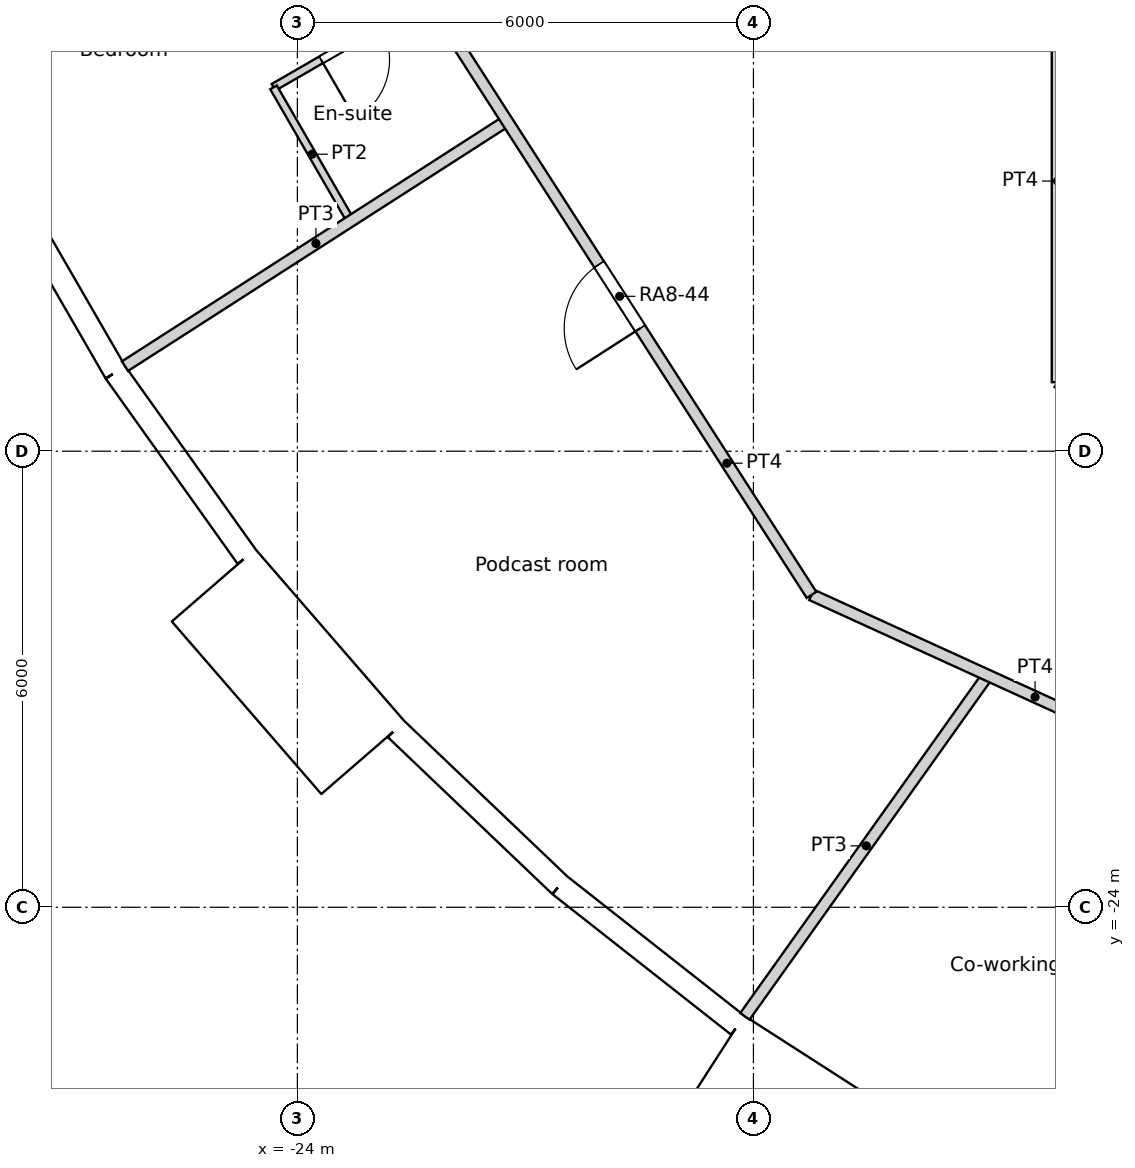
"""IFC4 building model, lengths in metres.
Left out: names, types, materials, properties, quantities, classifications, styles, units other than length and angle.
Written with IfcOpenShell. Run it as: python <this file> out.ifc"""

import sys

from ifc_helpers import new_model, si_unit, direction, frame, frame_2d, origin, origin_2d, place, context, subcontext, project, spatial, rectangle, circle, extrude, element, fill, save


model = new_model("IFC4")
c1 = context("Model", 3, precision=1e-05, world=origin(), true_north=direction((0.0, 1.0)))
c2 = subcontext(c1, "Body", "Model", "MODEL_VIEW")
j1 = project(units=[si_unit("LENGTHUNIT", "METRE"), si_unit("PLANEANGLEUNIT", "RADIAN")], contexts=[c1])
p1 = place(None, origin())
s1 = spatial("IfcSite", under=j1, at=p1, CompositionType="ELEMENT")
p2 = place(p1, origin())
s2 = spatial("IfcBuilding", under=s1, at=p2, CompositionType="ELEMENT")
p3 = place(p2, frame((0.0, 0.0, 103.8)))
s3 = spatial("IfcBuildingStorey", under=s2, at=p3, CompositionType="ELEMENT", Elevation=103.8)
for number, where, z_axis, x_axis in (
    (1, (-26.909, -13.873, 0.0), (0.0, 0.0, 1.0), (1.0, 0.0, 0.0)),
    (2, (-23.797, -18.715, 0.0), (0.0, 0.0, 1.0), (1.0, 0.0, 0.0)),
    (3, (-19.826, -22.88, 0.0), (0.0, 0.0, 1.0), (1.0, 0.0, 0.0)),
    (4, (-15.137, -26.219, 0.0), (0.0, 0.0, 1.0), (1.0, 0.0, 0.0)),
):
    element("IfcColumn", number, at=place(p3, frame(where, z_axis=z_axis, x_axis=x_axis)), inside=s3, PredefinedType="COLUMN", context=c2, shape_type="SweptSolid", body=[
        extrude(circle(Radius=0.6, at=origin_2d()), origin(), (0.0, 0.0, 1.0), 3.6),
    ])
for number, where, z_axis, x_axis in (
    (5, (-20.509, -13.489, 0.0), (0.0, 0.0, 1.0), (1.0, 0.0, 0.0)),
    (6, (-16.846, -17.855, 0.0), (0.0, 0.0, 1.0), (1.0, 0.0, 0.0)),
):
    element("IfcColumn", number, at=place(p3, frame(where, z_axis=z_axis, x_axis=x_axis)), inside=s3, PredefinedType="COLUMN", context=c2, shape_type="SweptSolid", body=[
        extrude(circle(Radius=0.65, at=origin_2d()), origin(), (0.0, 0.0, 1.0), 3.6),
    ])
p4 = place(p3, frame((-13.798, -12.802, 0.0), z_axis=(0.0, 0.0, 1.0), x_axis=(1.0, 0.0, 0.0)))
e7 = element("IfcColumn", 7, at=p4, inside=s3, PredefinedType="COLUMN", context=c2, shape_type="SweptSolid", body=[
    extrude(circle(Radius=0.7, at=origin_2d()), origin(), (0.0, 0.0, 1.0), 3.6),
])
p5 = place(p3, frame((-27.884, -14.382, 0.0), z_axis=(0.0, 0.0, 1.0), x_axis=(0.500025049464, -0.866010940986, 0.0)))
e8 = element("IfcWall", 8, at=p5, inside=s3, PredefinedType="SOLIDWALL", context=c2, shape_type="SweptSolid", body=[
    extrude(rectangle(XDim=2.98, YDim=0.3, at=frame_2d((1.49, 0.0))), origin(), (0.0, 0.0, 1.0), 3.15),
])
p6 = place(p5, frame((1.49, 0.0, 1.55)))
e9 = element("IfcOpeningElement", 9, at=p6, cuts=e8, PredefinedType="OPENING", context=c2, shape_type="SweptSolid", body=[
    extrude(circle(Radius=0.9, at=origin_2d()), frame((0.0, 0.16, 0.0), z_axis=(0.0, -1.0, 0.0), x_axis=(1.0, 0.0, 0.0)), (0.0, 0.0, 1.0), 0.32),
])
p7 = place(p3, frame((-26.394, -16.962, 0.0), z_axis=(0.0, 0.0, 1.0), x_axis=(0.580059407678, -0.81457417315, 0.0)))
e10 = element("IfcWall", 10, at=p7, inside=s3, PredefinedType="SOLIDWALL", context=c2, shape_type="SweptSolid", body=[
    extrude(rectangle(XDim=2.979, YDim=0.3, at=frame_2d((1.49, 0.0))), origin(), (0.0, 0.0, 1.0), 3.15),
])
p8 = place(p7, frame((1.49, 0.0, 1.55)))
e11 = element("IfcOpeningElement", 11, at=p8, cuts=e10, PredefinedType="OPENING", context=c2, shape_type="SweptSolid", body=[
    extrude(circle(Radius=0.9, at=origin_2d()), frame((0.0, 0.16, 0.0), z_axis=(0.0, -1.0, 0.0), x_axis=(1.0, 0.0, 0.0)), (0.0, 0.0, 1.0), 0.32),
])
p9 = place(p3, frame((-25.101, -19.766, -0.45), z_axis=(0.0, 0.0, 1.0), x_axis=(0.654890259022, -0.75572398972, 0.0)))
e12 = element("IfcWall", 12, at=p9, inside=s3, PredefinedType="ELEMENTEDWALL", context=c2, shape_type="SweptSolid", body=[
    extrude(rectangle(XDim=3.0, YDim=1.45, at=frame_2d((1.5, 0.0))), origin(), (0.0, 0.0, 1.0), 3.6),
])
p10 = place(p9, frame((1.5, 0.0, 2.0)))
e13 = element("IfcOpeningElement", 13, at=p10, cuts=e12, PredefinedType="OPENING", context=c2, shape_type="SweptSolid", body=[
    extrude(circle(Radius=0.9, at=origin_2d()), frame((0.0, 0.735, 0.0), z_axis=(0.0, -1.0, 0.0), x_axis=(1.0, 0.0, 0.0)), (0.0, 0.0, 1.0), 1.47),
])
p11 = place(p3, frame((-22.702, -21.655, 0.0), z_axis=(0.0, 0.0, 1.0), x_axis=(0.723744206617, -0.690068346896, 0.0)))
e14 = element("IfcWall", 14, at=p11, inside=s3, PredefinedType="SOLIDWALL", context=c2, shape_type="SweptSolid", body=[
    extrude(rectangle(XDim=2.98, YDim=0.3, at=frame_2d((1.49, 0.0))), origin(), (0.0, 0.0, 1.0), 3.15),
])
p12 = place(p11, frame((1.49, 0.0, 1.55)))
e15 = element("IfcOpeningElement", 15, at=p12, cuts=e14, PredefinedType="OPENING", context=c2, shape_type="SweptSolid", body=[
    extrude(circle(Radius=0.9, at=origin_2d()), frame((0.0, 0.16, 0.0), z_axis=(0.0, -1.0, 0.0), x_axis=(1.0, 0.0, 0.0)), (0.0, 0.0, 1.0), 0.32),
])
p13 = place(p3, frame((-20.546, -23.711, 0.0), z_axis=(0.0, 0.0, 1.0), x_axis=(0.786045331304, -0.618168858108, 0.0)))
e16 = element("IfcWall", 16, at=p13, inside=s3, PredefinedType="SOLIDWALL", context=c2, shape_type="SweptSolid", body=[
    extrude(rectangle(XDim=2.98, YDim=0.3, at=frame_2d((1.49, 0.0))), origin(), (0.0, 0.0, 1.0), 3.15),
])
p14 = place(p13, frame((1.49, 0.0, 1.55)))
e17 = element("IfcOpeningElement", 17, at=p14, cuts=e16, PredefinedType="OPENING", context=c2, shape_type="SweptSolid", body=[
    extrude(circle(Radius=0.9, at=origin_2d()), frame((0.0, 0.16, 0.0), z_axis=(0.0, -1.0, 0.0), x_axis=(1.0, 0.0, 0.0)), (0.0, 0.0, 1.0), 0.32),
])
p15 = place(p3, frame((-18.516, -26.037, -0.45), z_axis=(0.0, 0.0, 1.0), x_axis=(0.841223422347, -0.540687667415, 0.0)))
e18 = element("IfcWall", 18, at=p15, inside=s3, PredefinedType="ELEMENTEDWALL", context=c2, shape_type="SweptSolid", body=[
    extrude(rectangle(XDim=3.0, YDim=1.45, at=frame_2d((1.5, 0.0))), origin(), (0.0, 0.0, 1.0), 3.6),
])
p16 = place(p15, frame((1.5, 0.0, 2.0)))
e19 = element("IfcOpeningElement", 19, at=p16, cuts=e18, PredefinedType="OPENING", context=c2, shape_type="SweptSolid", body=[
    extrude(circle(Radius=0.9, at=origin_2d()), frame((0.0, 0.735, 0.0), z_axis=(0.0, -1.0, 0.0), x_axis=(1.0, 0.0, 0.0)), (0.0, 0.0, 1.0), 1.47),
])
p17 = place(p3, frame((-14.0, -17.092, 0.0), z_axis=(0.0, 0.0, 1.0), x_axis=(0.0, 1.0, 0.0)))
e20 = element("IfcWall", 20, at=p17, inside=s3, PredefinedType="PARTITIONING", context=c2, shape_type="SweptSolid", body=[
    extrude(rectangle(XDim=5.292, YDim=0.15, at=frame_2d((2.646, 0.0))), origin(), (0.0, 0.0, 1.0), 3.15),
])
p18 = place(p3, frame((-22.283, -12.036, 0.0), z_axis=(0.0, 0.0, 1.0), x_axis=(0.540591053907, -0.841285511842, 0.0)))
e21 = element("IfcWall", 21, at=p18, inside=s3, PredefinedType="PARTITIONING", context=c2, shape_type="SweptSolid", body=[
    extrude(rectangle(XDim=9.336, YDim=0.15, at=frame_2d((4.668, 0.0))), origin(), (0.0, 0.0, 1.0), 3.15),
])
p19 = place(p18, frame((4.167, 0.0, 0.0)))
e22 = element("IfcOpeningElement", 22, at=p19, cuts=e21, PredefinedType="OPENING", context=c2, shape_type="SweptSolid", body=[
    extrude(rectangle(XDim=1.0, YDim=2.04, at=frame_2d((0.5, 1.02))), frame((0.0, 0.075, 0.0), z_axis=(0.0, -1.0, 0.0), x_axis=(1.0, 0.0, 0.0)), (0.0, 0.0, 1.0), 0.15),
])
p20 = place(p3, frame((-14.0, -17.092, 0.0), z_axis=(0.0, 0.0, 1.0), x_axis=(0.86602719091, -0.499996904595, 0.0)))
e23 = element("IfcWall", 23, at=p20, inside=s3, PredefinedType="PARTITIONING", context=c2, shape_type="SweptSolid", body=[
    extrude(rectangle(XDim=9.42, YDim=0.15, at=frame_2d((4.71, 0.0))), origin(), (0.0, 0.0, 1.0), 3.15),
])
p21 = place(p3, frame((-17.235, -19.89, 0.0), z_axis=(0.0, 0.0, 1.0), x_axis=(0.909624174921, -0.415432136936, 0.0)))
e24 = element("IfcWall", 24, at=p21, inside=s3, PredefinedType="PARTITIONING", context=c2, shape_type="SweptSolid", body=[
    extrude(rectangle(XDim=14.83, YDim=0.15, at=frame_2d((7.415, 0.0))), origin(), (0.0, 0.0, 1.0), 3.15),
])
p22 = place(p21, frame((6.515, 0.0, 0.0)))
e25 = element("IfcOpeningElement", 25, at=p22, cuts=e24, PredefinedType="OPENING", context=c2, shape_type="SweptSolid", body=[
    extrude(rectangle(XDim=1.8, YDim=2.1, at=frame_2d((0.9, 1.05))), frame((0.0, 0.075, 0.0), z_axis=(0.0, -1.0, 0.0), x_axis=(1.0, 0.0, 0.0)), (0.0, 0.0, 1.0), 0.15),
])
p23 = place(p3, frame((-24.314, -13.213, 0.0), z_axis=(0.0, 0.0, 1.0), x_axis=(0.866007195875, 0.500031535699, 0.0)))
e26 = element("IfcWall", 26, at=p23, inside=s3, PredefinedType="PARTITIONING", context=c2, shape_type="SweptSolid", body=[
    extrude(rectangle(XDim=2.347, YDim=0.1, at=frame_2d((1.174, 0.0))), origin(), (0.0, 0.0, 1.0), 3.15),
])
p24 = place(p23, frame((0.724, 0.0, 0.0)))
e27 = element("IfcOpeningElement", 27, at=p24, cuts=e26, PredefinedType="OPENING", context=c2, shape_type="SweptSolid", body=[
    extrude(rectangle(XDim=0.9, YDim=2.04, at=frame_2d((0.45, 1.02))), frame((0.0, 0.05, 0.0), z_axis=(0.0, -1.0, 0.0), x_axis=(1.0, 0.0, 0.0)), (0.0, 0.0, 1.0), 0.1),
])
p25 = place(p3, frame((-24.314, -13.213, 0.0), z_axis=(0.0, 0.0, 1.0), x_axis=(0.499899251727, -0.866083563014, 0.0)))
e28 = element("IfcWall", 28, at=p25, inside=s3, PredefinedType="PARTITIONING", context=c2, shape_type="SweptSolid", body=[
    extrude(rectangle(XDim=2.032, YDim=0.1, at=frame_2d((1.016, 0.0))), origin(), (0.0, 0.0, 1.0), 3.15),
])
p26 = place(p3, frame((-26.268, -16.881, 0.0), z_axis=(0.0, 0.0, 1.0), x_axis=(0.841333855553, 0.540515812443, 0.0)))
e29 = element("IfcWall", 29, at=p26, inside=s3, PredefinedType="PARTITIONING", context=c2, shape_type="SweptSolid", body=[
    extrude(rectangle(XDim=5.972, YDim=0.15, at=frame_2d((2.986, 0.0))), origin(), (0.0, 0.0, 1.0), 3.15),
])
p27 = place(p3, frame((-18.112, -25.435, 0.0), z_axis=(0.0, 0.0, 1.0), x_axis=(0.580004598464, 0.81461320009, 0.0)))
e30 = element("IfcWall", 30, at=p27, inside=s3, PredefinedType="PARTITIONING", context=c2, shape_type="SweptSolid", body=[
    extrude(rectangle(XDim=5.507, YDim=0.15, at=frame_2d((2.753, 0.0))), origin(), (0.0, 0.0, 1.0), 3.15),
])
p28 = place(p6, origin())
e31 = element("IfcWindow", 31, at=p28, inside=s3, PartitioningType="SINGLE_PANEL", PredefinedType="WINDOW", context=c2, shape_type="SweptSolid", body=[
    extrude(circle(Radius=0.9, at=origin_2d()), frame((0.0, 0.12, 0.0), z_axis=(0.0, -1.0, 0.0), x_axis=(1.0, 0.0, 0.0)), (0.0, 0.0, 1.0), 0.1),
])
fill(e9, e31)
p29 = place(p8, origin())
e32 = element("IfcWindow", 32, at=p29, inside=s3, PartitioningType="SINGLE_PANEL", PredefinedType="WINDOW", context=c2, shape_type="SweptSolid", body=[
    extrude(circle(Radius=0.9, at=origin_2d()), frame((0.0, 0.12, 0.0), z_axis=(0.0, -1.0, 0.0), x_axis=(1.0, 0.0, 0.0)), (0.0, 0.0, 1.0), 0.1),
])
fill(e11, e32)
p30 = place(p10, origin())
e33 = element("IfcWindow", 33, at=p30, inside=s3, PartitioningType="SINGLE_PANEL", PredefinedType="WINDOW", context=c2, shape_type="SweptSolid", body=[
    extrude(circle(Radius=0.9, at=origin_2d()), frame((0.0, 0.695, 0.0), z_axis=(0.0, -1.0, 0.0), x_axis=(1.0, 0.0, 0.0)), (0.0, 0.0, 1.0), 0.1),
])
fill(e13, e33)
p31 = place(p12, origin())
e34 = element("IfcWindow", 34, at=p31, inside=s3, PartitioningType="SINGLE_PANEL", PredefinedType="WINDOW", context=c2, shape_type="SweptSolid", body=[
    extrude(circle(Radius=0.9, at=origin_2d()), frame((0.0, 0.12, 0.0), z_axis=(0.0, -1.0, 0.0), x_axis=(1.0, 0.0, 0.0)), (0.0, 0.0, 1.0), 0.1),
])
fill(e15, e34)
p32 = place(p14, origin())
e35 = element("IfcWindow", 35, at=p32, inside=s3, PartitioningType="SINGLE_PANEL", PredefinedType="WINDOW", context=c2, shape_type="SweptSolid", body=[
    extrude(circle(Radius=0.9, at=origin_2d()), frame((0.0, 0.12, 0.0), z_axis=(0.0, -1.0, 0.0), x_axis=(1.0, 0.0, 0.0)), (0.0, 0.0, 1.0), 0.1),
])
fill(e17, e35)
p33 = place(p16, origin())
e36 = element("IfcWindow", 36, at=p33, inside=s3, PartitioningType="SINGLE_PANEL", PredefinedType="WINDOW", context=c2, shape_type="SweptSolid", body=[
    extrude(circle(Radius=0.9, at=origin_2d()), frame((0.0, 0.695, 0.0), z_axis=(0.0, -1.0, 0.0), x_axis=(1.0, 0.0, 0.0)), (0.0, 0.0, 1.0), 0.1),
])
fill(e19, e36)
p34 = place(p24, origin())
e37 = element("IfcDoor", 37, at=p34, inside=s3, OperationType="SINGLE_SWING_RIGHT", PredefinedType="DOOR", context=c2, shape_type="SweptSolid", body=[
    extrude(rectangle(XDim=0.9, YDim=2.04, at=frame_2d((0.45, 1.02))), frame((0.0, 0.025, 0.0), z_axis=(0.0, -1.0, 0.0), x_axis=(1.0, 0.0, 0.0)), (0.0, 0.0, 1.0), 0.05),
])
fill(e27, e37)
p35 = place(p19, origin())
e38 = element("IfcDoor", 38, at=p35, inside=s3, OperationType="SINGLE_SWING_LEFT", PredefinedType="DOOR", context=c2, shape_type="SweptSolid", body=[
    extrude(rectangle(XDim=1.0, YDim=2.04, at=frame_2d((0.5, 1.02))), frame((0.0, 0.025, 0.0), z_axis=(0.0, -1.0, 0.0), x_axis=(1.0, 0.0, 0.0)), (0.0, 0.0, 1.0), 0.05),
])
fill(e22, e38)
save(model, sys.argv[1])
